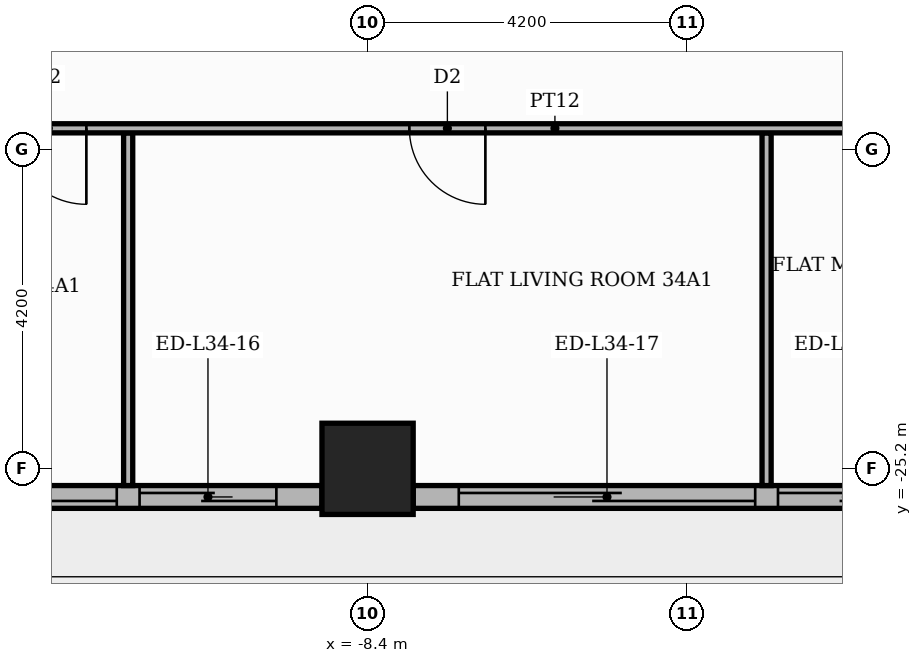
"""IFC4 building model, lengths in metres.
Left out: names, types, materials, properties, quantities, classifications, styles, units other than length and angle.
Written with IfcOpenShell. Run it as: python <this file> out.ifc"""

import sys

from ifc_helpers import new_model, si_unit, direction, frame, frame_2d, origin, origin_2d, place, context, subcontext, project, spatial, rectangle, extrude, element, fill, save


model = new_model("IFC4")
c1 = context("Model", 3, precision=1e-05, world=origin(), true_north=direction((0.0, 1.0)))
c2 = subcontext(c1, "Body", "Model", "MODEL_VIEW")
j1 = project(units=[si_unit("LENGTHUNIT", "METRE"), si_unit("PLANEANGLEUNIT", "RADIAN")], contexts=[c1])
p1 = place(None, origin())
s1 = spatial("IfcSite", under=j1, at=p1, CompositionType="ELEMENT")
p2 = place(p1, origin())
s2 = spatial("IfcBuilding", under=s1, at=p2, CompositionType="ELEMENT")
p3 = place(p2, frame((0.0, 0.0, 145.5)))
s3 = spatial("IfcBuildingStorey", under=s2, at=p3, CompositionType="ELEMENT", Elevation=145.5)
p4 = place(p3, frame((-8.4, -25.2, 0.0), z_axis=(0.0, 0.0, 1.0), x_axis=(1.0, 0.0, 0.0)))
e1 = element("IfcColumn", 1, at=p4, inside=s3, PredefinedType="COLUMN", context=c2, shape_type="SweptSolid", body=[
    extrude(rectangle(XDim=1.2, YDim=1.2, at=origin_2d()), origin(), (0.0, 0.0, 1.0), 3.9),
])
p5 = place(p3, frame((-16.2, -25.57, 0.0), z_axis=(0.0, 0.0, 1.0), x_axis=(1.0, 0.0, 0.0)))
e2 = element("IfcWall", 2, at=p5, inside=s3, PredefinedType="STANDARD", context=c2, shape_type="SweptSolid", body=[
    extrude(rectangle(XDim=7.2, YDim=0.3, at=frame_2d((3.6, 0.0))), origin(), (0.0, 0.0, 1.0), 3.48),
])
p6 = place(p5, frame((0.6, 0.0, 0.0)))
e3 = element("IfcOpeningElement", 3, at=p6, cuts=e2, PredefinedType="OPENING", context=c2, shape_type="SweptSolid", body=[
    extrude(rectangle(XDim=3.9, YDim=2.4, at=frame_2d((1.95, 1.2))), frame((0.0, 0.16, 0.0), z_axis=(0.0, -1.0, 0.0), x_axis=(1.0, 0.0, 0.0)), (0.0, 0.0, 1.0), 0.32),
])
p7 = place(p5, frame((4.8, 0.0, 0.0)))
e4 = element("IfcOpeningElement", 4, at=p7, cuts=e2, PredefinedType="OPENING", context=c2, shape_type="SweptSolid", body=[
    extrude(rectangle(XDim=1.8, YDim=2.4, at=frame_2d((0.9, 1.2))), frame((0.0, 0.16, 0.0), z_axis=(0.0, -1.0, 0.0), x_axis=(1.0, 0.0, 0.0)), (0.0, 0.0, 1.0), 0.32),
])
p8 = place(p3, frame((-7.8, -25.57, 0.0), z_axis=(0.0, 0.0, 1.0), x_axis=(1.0, 0.0, 0.0)))
e5 = element("IfcWall", 5, at=p8, inside=s3, PredefinedType="STANDARD", context=c2, shape_type="SweptSolid", body=[
    extrude(rectangle(XDim=7.2, YDim=0.3, at=frame_2d((3.6, 0.0))), origin(), (0.0, 0.0, 1.0), 3.48),
])
p9 = place(p8, frame((0.6, 0.0, 0.0)))
e6 = element("IfcOpeningElement", 6, at=p9, cuts=e5, PredefinedType="OPENING", context=c2, shape_type="SweptSolid", body=[
    extrude(rectangle(XDim=3.9, YDim=2.4, at=frame_2d((1.95, 1.2))), frame((0.0, 0.16, 0.0), z_axis=(0.0, -1.0, 0.0), x_axis=(1.0, 0.0, 0.0)), (0.0, 0.0, 1.0), 0.32),
])
p10 = place(p8, frame((4.8, 0.0, 0.0)))
e7 = element("IfcOpeningElement", 7, at=p10, cuts=e5, PredefinedType="OPENING", context=c2, shape_type="SweptSolid", body=[
    extrude(rectangle(XDim=1.8, YDim=2.4, at=frame_2d((0.9, 1.2))), frame((0.0, 0.16, 0.0), z_axis=(0.0, -1.0, 0.0), x_axis=(1.0, 0.0, 0.0)), (0.0, 0.0, 1.0), 0.32),
])
for number, where, z_axis, x_axis in (
    (8, (-11.55, -25.42, 0.0), (0.0, 0.0, 1.0), (0.0, 1.0, 0.0)),
    (9, (-3.15, -25.42, 0.0), (0.0, 0.0, 1.0), (0.0, 1.0, 0.0)),
):
    element("IfcWall", number, at=place(p3, frame(where, z_axis=z_axis, x_axis=x_axis)), inside=s3, PredefinedType="PARTITIONING", context=c2, shape_type="SweptSolid", body=[
        extrude(rectangle(XDim=4.64, YDim=0.12, at=frame_2d((2.32, 0.0))), origin(), (0.0, 0.0, 1.0), 3.48),
    ])
p11 = place(p3, frame((-25.42, -20.72, 0.0), z_axis=(0.0, 0.0, 1.0), x_axis=(1.0, 0.0, 0.0)))
e10 = element("IfcWall", 10, at=p11, inside=s3, PredefinedType="PARTITIONING", context=c2, shape_type="SweptSolid", body=[
    extrude(rectangle(XDim=38.97, YDim=0.12, at=frame_2d((19.485, 0.0))), origin(), (0.0, 0.0, 1.0), 3.48),
])
p12 = place(p11, frame((12.32, 0.0, 0.0)))
e11 = element("IfcOpeningElement", 11, at=p12, cuts=e10, PredefinedType="OPENING", context=c2, shape_type="SweptSolid", body=[
    extrude(rectangle(XDim=1.0, YDim=2.1, at=frame_2d((0.5, 1.05))), frame((0.0, 0.07, 0.0), z_axis=(0.0, -1.0, 0.0), x_axis=(1.0, 0.0, 0.0)), (0.0, 0.0, 1.0), 0.14),
])
p13 = place(p11, frame((17.57, 0.0, 0.0)))
e12 = element("IfcOpeningElement", 12, at=p13, cuts=e10, PredefinedType="OPENING", context=c2, shape_type="SweptSolid", body=[
    extrude(rectangle(XDim=1.0, YDim=2.1, at=frame_2d((0.5, 1.05))), frame((0.0, 0.07, 0.0), z_axis=(0.0, -1.0, 0.0), x_axis=(1.0, 0.0, 0.0)), (0.0, 0.0, 1.0), 0.14),
])
p14 = place(p11, frame((24.97, 0.0, 0.0)))
e13 = element("IfcOpeningElement", 13, at=p14, cuts=e10, PredefinedType="OPENING", context=c2, shape_type="SweptSolid", body=[
    extrude(rectangle(XDim=0.9, YDim=2.1, at=frame_2d((0.45, 1.05))), frame((0.0, 0.07, 0.0), z_axis=(0.0, -1.0, 0.0), x_axis=(1.0, 0.0, 0.0)), (0.0, 0.0, 1.0), 0.14),
])
p15 = place(p11, frame((34.42, 0.0, 0.0)))
e14 = element("IfcOpeningElement", 14, at=p15, cuts=e10, PredefinedType="OPENING", context=c2, shape_type="SweptSolid", body=[
    extrude(rectangle(XDim=0.9, YDim=2.1, at=frame_2d((0.45, 1.05))), frame((0.0, 0.07, 0.0), z_axis=(0.0, -1.0, 0.0), x_axis=(1.0, 0.0, 0.0)), (0.0, 0.0, 1.0), 0.14),
])
p16 = place(p6, origin())
e15 = element("IfcDoor", 15, at=p16, inside=s3, OperationType="SLIDING_TO_LEFT", PredefinedType="DOOR", context=c2, shape_type="SweptSolid", body=[
    extrude(rectangle(XDim=3.9, YDim=2.4, at=frame_2d((1.95, 1.2))), frame((0.0, 0.025, 0.0), z_axis=(0.0, -1.0, 0.0), x_axis=(1.0, 0.0, 0.0)), (0.0, 0.0, 1.0), 0.05),
])
fill(e3, e15)
p17 = place(p7, origin())
e16 = element("IfcDoor", 16, at=p17, inside=s3, OperationType="SLIDING_TO_RIGHT", PredefinedType="DOOR", context=c2, shape_type="SweptSolid", body=[
    extrude(rectangle(XDim=1.8, YDim=2.4, at=frame_2d((0.9, 1.2))), frame((0.0, 0.025, 0.0), z_axis=(0.0, -1.0, 0.0), x_axis=(1.0, 0.0, 0.0)), (0.0, 0.0, 1.0), 0.05),
])
fill(e4, e16)
p18 = place(p9, origin())
e17 = element("IfcDoor", 17, at=p18, inside=s3, OperationType="SLIDING_TO_LEFT", PredefinedType="DOOR", context=c2, shape_type="SweptSolid", body=[
    extrude(rectangle(XDim=3.9, YDim=2.4, at=frame_2d((1.95, 1.2))), frame((0.0, 0.025, 0.0), z_axis=(0.0, -1.0, 0.0), x_axis=(1.0, 0.0, 0.0)), (0.0, 0.0, 1.0), 0.05),
])
fill(e6, e17)
p19 = place(p10, origin())
e18 = element("IfcDoor", 18, at=p19, inside=s3, OperationType="SLIDING_TO_RIGHT", PredefinedType="DOOR", context=c2, shape_type="SweptSolid", body=[
    extrude(rectangle(XDim=1.8, YDim=2.4, at=frame_2d((0.9, 1.2))), frame((0.0, 0.025, 0.0), z_axis=(0.0, -1.0, 0.0), x_axis=(1.0, 0.0, 0.0)), (0.0, 0.0, 1.0), 0.05),
])
fill(e7, e18)
p20 = place(p12, frame((1.0, 0.0, 0.0), z_axis=(0.0, 0.0, 1.0), x_axis=(-1.0, 0.0, 0.0)))
e19 = element("IfcDoor", 19, at=p20, inside=s3, OperationType="SINGLE_SWING_RIGHT", PredefinedType="DOOR", context=c2, shape_type="SweptSolid", body=[
    extrude(rectangle(XDim=1.0, YDim=2.1, at=frame_2d((0.5, 1.05))), frame((0.0, 0.025, 0.0), z_axis=(0.0, -1.0, 0.0), x_axis=(1.0, 0.0, 0.0)), (0.0, 0.0, 1.0), 0.05),
])
fill(e11, e19)
p21 = place(p13, frame((1.0, 0.0, 0.0), z_axis=(0.0, 0.0, 1.0), x_axis=(-1.0, 0.0, 0.0)))
e20 = element("IfcDoor", 20, at=p21, inside=s3, OperationType="SINGLE_SWING_RIGHT", PredefinedType="DOOR", context=c2, shape_type="SweptSolid", body=[
    extrude(rectangle(XDim=1.0, YDim=2.1, at=frame_2d((0.5, 1.05))), frame((0.0, 0.025, 0.0), z_axis=(0.0, -1.0, 0.0), x_axis=(1.0, 0.0, 0.0)), (0.0, 0.0, 1.0), 0.05),
])
fill(e12, e20)
save(model, sys.argv[1])
